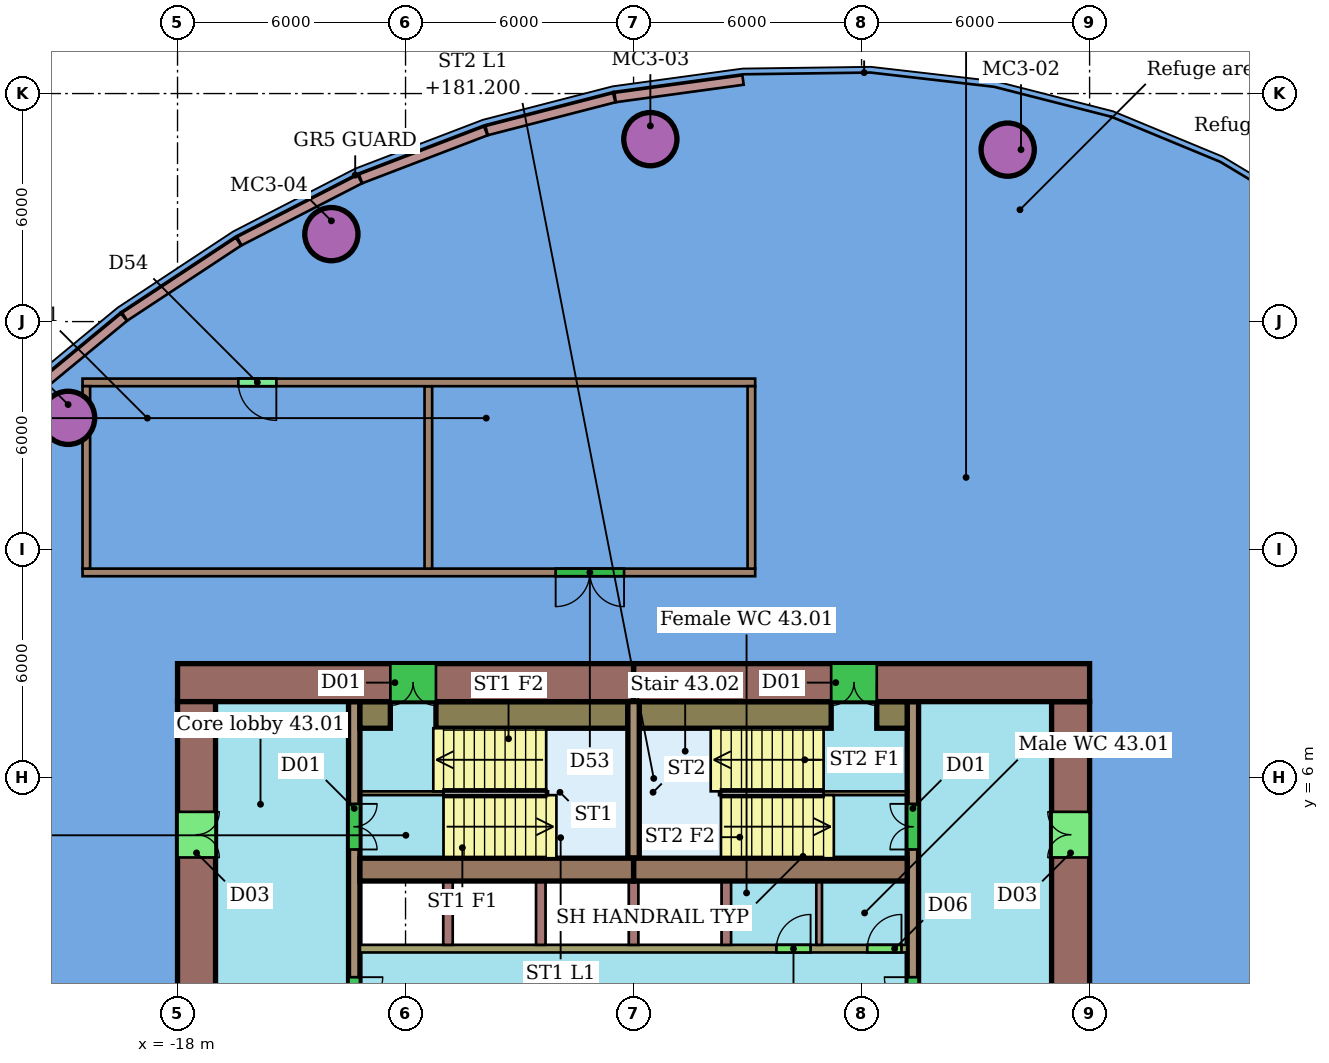
"""IFC4 building model, lengths in metres.
Left out: names, types, materials, properties, quantities, classifications, styles, units other than length and angle.
Written with IfcOpenShell. Run it as: python <this file> out.ifc"""

import sys

from ifc_helpers import new_model, si_unit, direction, frame, frame_2d, origin, origin_2d, place, context, subcontext, project, spatial, rectangle, hollow_circle, extrude, element, fill, save


model = new_model("IFC4")
c1 = context("Model", 3, precision=1e-05, world=origin(), true_north=direction((0.0, 1.0)))
c2 = subcontext(c1, "Body", "Model", "MODEL_VIEW")
j1 = project(units=[si_unit("LENGTHUNIT", "METRE"), si_unit("PLANEANGLEUNIT", "RADIAN")], contexts=[c1])
p1 = place(None, origin())
s1 = spatial("IfcSite", under=j1, at=p1, CompositionType="ELEMENT")
p2 = place(p1, origin())
s2 = spatial("IfcBuilding", under=s1, at=p2, CompositionType="ELEMENT")
p3 = place(p2, frame((0.0, 0.0, 179.4)))
s3 = spatial("IfcBuildingStorey", under=s2, at=p3, CompositionType="ELEMENT", Elevation=179.4)
for number, where, z_axis, x_axis in (
    (1, (3.845, 22.524, 0.0), (0.0, 0.0, 1.0), (1.0, 0.0, 0.0)),
    (2, (-5.558, 22.8, 0.0), (0.0, 0.0, 1.0), (1.0, 0.0, 0.0)),
    (3, (-13.952, 20.301, 0.0), (0.0, 0.0, 1.0), (1.0, 0.0, 0.0)),
    (4, (-20.879, 15.467, 0.0), (0.0, 0.0, 1.0), (1.0, 0.0, 0.0)),
):
    element("IfcColumn", number, at=place(p3, frame(where, z_axis=z_axis, x_axis=x_axis)), inside=s3, PredefinedType="COLUMN", context=c2, shape_type="SweptSolid", body=[
        extrude(hollow_circle(Radius=0.7, WallThickness=0.05, at=origin_2d()), origin(), (0.0, 0.0, 1.0), 3.45),
    ])
p4 = place(p3, frame((-2.8, 11.4, 0.0), z_axis=(0.0, 0.0, 1.0), x_axis=(-1.0, 0.0, 0.0)))
e5 = element("IfcWall", 5, at=p4, inside=s3, PredefinedType="PARTITIONING", context=c2, shape_type="SweptSolid", body=[
    extrude(rectangle(XDim=17.7, YDim=0.2, at=frame_2d((8.85, 0.0))), origin(), (0.0, 0.0, 1.0), 2.862),
])
p5 = place(p4, frame((3.45, 0.0, 0.0)))
e6 = element("IfcOpeningElement", 6, at=p5, cuts=e5, PredefinedType="OPENING", context=c2, shape_type="SweptSolid", body=[
    extrude(rectangle(XDim=1.8, YDim=2.4, at=frame_2d((0.9, 1.2))), frame((0.0, 0.11, 0.0), z_axis=(0.0, -1.0, 0.0), x_axis=(1.0, 0.0, 0.0)), (0.0, 0.0, 1.0), 0.22),
])
p6 = place(p3, frame((-11.4, 11.5, 0.0), z_axis=(0.0, 0.0, 1.0), x_axis=(0.0, 1.0, 0.0)))
e7 = element("IfcWall", 7, at=p6, inside=s3, PredefinedType="PARTITIONING", context=c2, shape_type="SweptSolid", body=[
    extrude(rectangle(XDim=4.8, YDim=0.2, at=frame_2d((2.4, 0.0))), origin(), (0.0, 0.0, 1.0), 2.862),
])
p7 = place(p3, frame((-2.8, 16.4, 0.0), z_axis=(0.0, 0.0, 1.0), x_axis=(-1.0, 0.0, 0.0)))
e8 = element("IfcWall", 8, at=p7, inside=s3, PredefinedType="PARTITIONING", context=c2, shape_type="SweptSolid", body=[
    extrude(rectangle(XDim=17.7, YDim=0.2, at=frame_2d((8.85, 0.0))), origin(), (0.0, 0.0, 1.0), 2.862),
])
p8 = place(p7, frame((12.6, 0.0, 0.0)))
e9 = element("IfcOpeningElement", 9, at=p8, cuts=e8, PredefinedType="OPENING", context=c2, shape_type="SweptSolid", body=[
    extrude(rectangle(XDim=1.0, YDim=2.1, at=frame_2d((0.5, 1.05))), frame((0.0, 0.11, 0.0), z_axis=(0.0, -1.0, 0.0), x_axis=(1.0, 0.0, 0.0)), (0.0, 0.0, 1.0), 0.22),
])
for number, where, z_axis, x_axis in (
    (10, (-20.4, 11.5, 0.0), (0.0, 0.0, 1.0), (0.0, 1.0, 0.0)),
    (11, (-2.9, 11.5, 0.0), (0.0, 0.0, 1.0), (0.0, 1.0, 0.0)),
):
    element("IfcWall", number, at=place(p3, frame(where, z_axis=z_axis, x_axis=x_axis)), inside=s3, PredefinedType="PARTITIONING", context=c2, shape_type="SweptSolid", body=[
        extrude(rectangle(XDim=4.8, YDim=0.2, at=frame_2d((2.4, 0.0))), origin(), (0.0, 0.0, 1.0), 2.862),
    ])
p9 = place(p3, frame((-3.119, 24.356, 0.0), z_axis=(0.0, 0.0, 1.0), x_axis=(-0.990801720843, -0.135321653757, 0.0)))
e12 = element("IfcWall", 12, at=p9, inside=s3, PredefinedType="SOLIDWALL", context=c2, shape_type="SweptSolid", body=[
    extrude(rectangle(XDim=3.397, YDim=0.25, at=frame_2d((1.699, 0.0))), origin(), (0.0, 0.0, 1.0), 3.1),
])
p10 = place(p3, frame((-6.507, 23.892, 0.0), z_axis=(0.0, 0.0, 1.0), x_axis=(-0.968247112596, -0.249995057849, 0.0)))
e13 = element("IfcWall", 13, at=p10, inside=s3, PredefinedType="SOLIDWALL", context=c2, shape_type="SweptSolid", body=[
    extrude(rectangle(XDim=3.47, YDim=0.25, at=frame_2d((1.735, 0.0))), origin(), (0.0, 0.0, 1.0), 3.1),
])
p11 = place(p3, frame((-9.888, 23.018, 0.0), z_axis=(0.0, 0.0, 1.0), x_axis=(-0.933996829101, -0.357281294262, 0.0)))
e14 = element("IfcWall", 14, at=p11, inside=s3, PredefinedType="SOLIDWALL", context=c2, shape_type="SweptSolid", body=[
    extrude(rectangle(XDim=3.528, YDim=0.25, at=frame_2d((1.764, 0.0))), origin(), (0.0, 0.0, 1.0), 3.1),
])
p12 = place(p3, frame((-13.203, 21.748, 0.0), z_axis=(0.0, 0.0, 1.0), x_axis=(-0.889237716381, -0.457445388833, 0.0)))
e15 = element("IfcWall", 15, at=p12, inside=s3, PredefinedType="SOLIDWALL", context=c2, shape_type="SweptSolid", body=[
    extrude(rectangle(XDim=3.569, YDim=0.25, at=frame_2d((1.784, 0.0))), origin(), (0.0, 0.0, 1.0), 3.1),
])
p13 = place(p3, frame((-16.395, 20.105, 0.0), z_axis=(0.0, 0.0, 1.0), x_axis=(-0.834771348856, -0.55059676273, 0.0)))
e16 = element("IfcWall", 16, at=p13, inside=s3, PredefinedType="SOLIDWALL", context=c2, shape_type="SweptSolid", body=[
    extrude(rectangle(XDim=3.589, YDim=0.25, at=frame_2d((1.795, 0.0))), origin(), (0.0, 0.0, 1.0), 3.1),
])
p14 = place(p3, frame((-19.409, 18.116, 0.0), z_axis=(0.0, 0.0, 1.0), x_axis=(-0.771012569009, -0.63681992622, 0.0)))
e17 = element("IfcWall", 17, at=p14, inside=s3, PredefinedType="SOLIDWALL", context=c2, shape_type="SweptSolid", body=[
    extrude(rectangle(XDim=3.59, YDim=0.25, at=frame_2d((1.795, 0.0))), origin(), (0.0, 0.0, 1.0), 3.1),
])
p15 = place(p3, frame((6.0, 8.5, 0.0), z_axis=(0.0, 0.0, 1.0), x_axis=(-1.0, 0.0, 0.0)))
e18 = element("IfcWall", 18, at=p15, inside=s3, PredefinedType="SHEAR", context=c2, shape_type="SweptSolid", body=[
    extrude(rectangle(XDim=12.0, YDim=1.0, at=frame_2d((6.0, 0.0))), origin(), (0.0, 0.0, 1.0), 3.3),
])
p16 = place(p15, frame((5.6, 0.0, 0.0)))
e19 = element("IfcOpeningElement", 19, at=p16, cuts=e18, PredefinedType="OPENING", context=c2, shape_type="SweptSolid", body=[
    extrude(rectangle(XDim=1.2, YDim=2.1, at=frame_2d((0.6, 1.05))), frame((0.0, 0.51, 0.0), z_axis=(0.0, -1.0, 0.0), x_axis=(1.0, 0.0, 0.0)), (0.0, 0.0, 1.0), 1.02),
])
p17 = place(p3, frame((-6.0, 8.5, 0.0), z_axis=(0.0, 0.0, 1.0), x_axis=(-1.0, 0.0, 0.0)))
e20 = element("IfcWall", 20, at=p17, inside=s3, PredefinedType="SHEAR", context=c2, shape_type="SweptSolid", body=[
    extrude(rectangle(XDim=12.0, YDim=1.0, at=frame_2d((6.0, 0.0))), origin(), (0.0, 0.0, 1.0), 3.3),
])
p18 = place(p17, frame((5.2, 0.0, 0.0)))
e21 = element("IfcOpeningElement", 21, at=p18, cuts=e20, PredefinedType="OPENING", context=c2, shape_type="SweptSolid", body=[
    extrude(rectangle(XDim=1.2, YDim=2.1, at=frame_2d((0.6, 1.05))), frame((0.0, 0.51, 0.0), z_axis=(0.0, -1.0, 0.0), x_axis=(1.0, 0.0, 0.0)), (0.0, 0.0, 1.0), 1.02),
])
p19 = place(p3, frame((-17.5, 8.0, 0.0), z_axis=(0.0, 0.0, 1.0), x_axis=(0.0, -1.0, 0.0)))
e22 = element("IfcWall", 22, at=p19, inside=s3, PredefinedType="SHEAR", context=c2, shape_type="SweptSolid", body=[
    extrude(rectangle(XDim=16.0, YDim=1.0, at=frame_2d((8.0, 0.0))), origin(), (0.0, 0.0, 1.0), 3.3),
])
p20 = place(p19, frame((11.9, 0.0, 0.0)))
e23 = element("IfcOpeningElement", 23, at=p20, cuts=e22, PredefinedType="OPENING", context=c2, shape_type="SweptSolid", body=[
    extrude(rectangle(XDim=1.2, YDim=2.1, at=frame_2d((0.6, 1.05))), frame((0.0, 0.51, 0.0), z_axis=(0.0, -1.0, 0.0), x_axis=(1.0, 0.0, 0.0)), (0.0, 0.0, 1.0), 1.02),
])
p21 = place(p19, frame((2.9, 0.0, 0.0)))
e24 = element("IfcOpeningElement", 24, at=p21, cuts=e22, PredefinedType="OPENING", context=c2, shape_type="SweptSolid", body=[
    extrude(rectangle(XDim=1.2, YDim=2.1, at=frame_2d((0.6, 1.05))), frame((0.0, 0.51, 0.0), z_axis=(0.0, -1.0, 0.0), x_axis=(1.0, 0.0, 0.0)), (0.0, 0.0, 1.0), 1.02),
])
p22 = place(p3, frame((5.5, -8.0, 0.0), z_axis=(0.0, 0.0, 1.0), x_axis=(0.0, 1.0, 0.0)))
e25 = element("IfcWall", 25, at=p22, inside=s3, PredefinedType="SHEAR", context=c2, shape_type="SweptSolid", body=[
    extrude(rectangle(XDim=16.0, YDim=1.0, at=frame_2d((8.0, 0.0))), origin(), (0.0, 0.0, 1.0), 3.3),
])
p23 = place(p22, frame((2.9, 0.0, 0.0)))
e26 = element("IfcOpeningElement", 26, at=p23, cuts=e25, PredefinedType="OPENING", context=c2, shape_type="SweptSolid", body=[
    extrude(rectangle(XDim=1.2, YDim=2.1, at=frame_2d((0.6, 1.05))), frame((0.0, 0.51, 0.0), z_axis=(0.0, -1.0, 0.0), x_axis=(1.0, 0.0, 0.0)), (0.0, 0.0, 1.0), 1.02),
])
p24 = place(p22, frame((11.9, 0.0, 0.0)))
e27 = element("IfcOpeningElement", 27, at=p24, cuts=e25, PredefinedType="OPENING", context=c2, shape_type="SweptSolid", body=[
    extrude(rectangle(XDim=1.2, YDim=2.1, at=frame_2d((0.6, 1.05))), frame((0.0, 0.51, 0.0), z_axis=(0.0, -1.0, 0.0), x_axis=(1.0, 0.0, 0.0)), (0.0, 0.0, 1.0), 1.02),
])
for number, where, z_axis, x_axis in (
    (28, (-13.2, 3.58, 0.0), (0.0, 0.0, 1.0), (1.0, 0.0, 0.0)),
    (29, (-6.0, 3.58, 0.0), (0.0, 0.0, 1.0), (1.0, 0.0, 0.0)),
):
    element("IfcWall", number, at=place(p3, frame(where, z_axis=z_axis, x_axis=x_axis)), inside=s3, PredefinedType="SHEAR", context=c2, shape_type="SweptSolid", body=[
        extrude(rectangle(XDim=7.2, YDim=0.6, at=frame_2d((3.6, 0.0))), origin(), (0.0, 0.0, 1.0), 3.3),
    ])
p25 = place(p3, frame((-13.35, 8.0, 0.0), z_axis=(0.0, 0.0, 1.0), x_axis=(0.0, -1.0, 0.0)))
e30 = element("IfcWall", 30, at=p25, inside=s3, PredefinedType="SHEAR", context=c2, shape_type="SweptSolid", body=[
    extrude(rectangle(XDim=16.0, YDim=0.3, at=frame_2d((8.0, 0.0))), origin(), (0.0, 0.0, 1.0), 3.3),
])
p26 = place(p25, frame((2.69, 0.0, 0.0)))
e31 = element("IfcOpeningElement", 31, at=p26, cuts=e30, PredefinedType="OPENING", context=c2, shape_type="SweptSolid", body=[
    extrude(rectangle(XDim=1.2, YDim=2.1, at=frame_2d((0.6, 1.05))), frame((0.0, 0.16, 0.0), z_axis=(0.0, -1.0, 0.0), x_axis=(1.0, 0.0, 0.0)), (0.0, 0.0, 1.0), 0.32),
])
p27 = place(p25, frame((12.99, 0.0, 0.0)))
e32 = element("IfcOpeningElement", 32, at=p27, cuts=e30, PredefinedType="OPENING", context=c2, shape_type="SweptSolid", body=[
    extrude(rectangle(XDim=1.2, YDim=2.1, at=frame_2d((0.6, 1.05))), frame((0.0, 0.16, 0.0), z_axis=(0.0, -1.0, 0.0), x_axis=(1.0, 0.0, 0.0)), (0.0, 0.0, 1.0), 0.32),
])
p28 = place(p25, frame((7.25, 0.0, 0.0)))
e33 = element("IfcOpeningElement", 33, at=p28, cuts=e30, PredefinedType="OPENING", context=c2, shape_type="SweptSolid", body=[
    extrude(rectangle(XDim=1.5, YDim=2.1, at=frame_2d((0.75, 1.05))), frame((0.0, 0.16, 0.0), z_axis=(0.0, -1.0, 0.0), x_axis=(1.0, 0.0, 0.0)), (0.0, 0.0, 1.0), 0.32),
])
p29 = place(p3, frame((1.35, -8.0, 0.0), z_axis=(0.0, 0.0, 1.0), x_axis=(0.0, 1.0, 0.0)))
e34 = element("IfcWall", 34, at=p29, inside=s3, PredefinedType="SHEAR", context=c2, shape_type="SweptSolid", body=[
    extrude(rectangle(XDim=16.0, YDim=0.3, at=frame_2d((8.0, 0.0))), origin(), (0.0, 0.0, 1.0), 3.3),
])
p30 = place(p29, frame((12.11, 0.0, 0.0)))
e35 = element("IfcOpeningElement", 35, at=p30, cuts=e34, PredefinedType="OPENING", context=c2, shape_type="SweptSolid", body=[
    extrude(rectangle(XDim=1.2, YDim=2.1, at=frame_2d((0.6, 1.05))), frame((0.0, 0.16, 0.0), z_axis=(0.0, -1.0, 0.0), x_axis=(1.0, 0.0, 0.0)), (0.0, 0.0, 1.0), 0.32),
])
p31 = place(p29, frame((1.91, 0.0, 0.0)))
e36 = element("IfcOpeningElement", 36, at=p31, cuts=e34, PredefinedType="OPENING", context=c2, shape_type="SweptSolid", body=[
    extrude(rectangle(XDim=1.0, YDim=2.1, at=frame_2d((0.5, 1.05))), frame((0.0, 0.16, 0.0), z_axis=(0.0, -1.0, 0.0), x_axis=(1.0, 0.0, 0.0)), (0.0, 0.0, 1.0), 0.32),
])
p32 = place(p29, frame((7.25, 0.0, 0.0)))
e37 = element("IfcOpeningElement", 37, at=p32, cuts=e34, PredefinedType="OPENING", context=c2, shape_type="SweptSolid", body=[
    extrude(rectangle(XDim=1.5, YDim=2.1, at=frame_2d((0.75, 1.05))), frame((0.0, 0.16, 0.0), z_axis=(0.0, -1.0, 0.0), x_axis=(1.0, 0.0, 0.0)), (0.0, 0.0, 1.0), 0.32),
])
p33 = place(p3, frame((-13.2, 1.5, 0.0), z_axis=(0.0, 0.0, 1.0), x_axis=(1.0, 0.0, 0.0)))
e38 = element("IfcWall", 38, at=p33, inside=s3, PredefinedType="SHEAR", context=c2, shape_type="SweptSolid", body=[
    extrude(rectangle(XDim=14.4, YDim=0.2, at=frame_2d((7.2, 0.0))), origin(), (0.0, 0.0, 1.0), 3.3),
])
p34 = place(p33, frame((10.958, 0.0, 0.0)))
e39 = element("IfcOpeningElement", 39, at=p34, cuts=e38, PredefinedType="OPENING", context=c2, shape_type="SweptSolid", body=[
    extrude(rectangle(XDim=0.9, YDim=2.1, at=frame_2d((0.45, 1.05))), frame((0.0, 0.11, 0.0), z_axis=(0.0, -1.0, 0.0), x_axis=(1.0, 0.0, 0.0)), (0.0, 0.0, 1.0), 0.22),
])
p35 = place(p33, frame((13.35, 0.0, 0.0)))
e40 = element("IfcOpeningElement", 40, at=p35, cuts=e38, PredefinedType="OPENING", context=c2, shape_type="SweptSolid", body=[
    extrude(rectangle(XDim=0.9, YDim=2.1, at=frame_2d((0.45, 1.05))), frame((0.0, 0.11, 0.0), z_axis=(0.0, -1.0, 0.0), x_axis=(1.0, 0.0, 0.0)), (0.0, 0.0, 1.0), 0.22),
])
p36 = place(p3, frame((-6.0, 3.88, 0.0), z_axis=(0.0, 0.0, 1.0), x_axis=(0.0, 1.0, 0.0)))
e41 = element("IfcWall", 41, at=p36, inside=s3, PredefinedType="SHEAR", context=c2, shape_type="SweptSolid", body=[
    extrude(rectangle(XDim=4.12, YDim=0.3, at=frame_2d((2.06, 0.0))), origin(), (0.0, 0.0, 1.0), 3.3),
])
p37 = place(p3, frame((-13.2, 7.65, 0.0), z_axis=(0.0, 0.0, 1.0), x_axis=(1.0, 0.0, 0.0)))
e42 = element("IfcWall", 42, at=p37, inside=s3, PredefinedType="SHEAR", context=c2, shape_type="SweptSolid", body=[
    extrude(rectangle(XDim=0.8, YDim=0.7, at=frame_2d((0.4, 0.0))), origin(), (0.0, 0.0, 1.0), 3.3),
])
for number, where, z_axis, x_axis in (
    (43, (-11.2, 7.65, 0.0), (0.0, 0.0, 1.0), (1.0, 0.0, 0.0)),
    (44, (-5.85, 7.65, 0.0), (0.0, 0.0, 1.0), (1.0, 0.0, 0.0)),
):
    element("IfcWall", number, at=place(p3, frame(where, z_axis=z_axis, x_axis=x_axis)), inside=s3, PredefinedType="SHEAR", context=c2, shape_type="SweptSolid", body=[
        extrude(rectangle(XDim=5.05, YDim=0.7, at=frame_2d((2.525, 0.0))), origin(), (0.0, 0.0, 1.0), 3.3),
    ])
p38 = place(p3, frame((0.4, 7.65, 0.0), z_axis=(0.0, 0.0, 1.0), x_axis=(1.0, 0.0, 0.0)))
e45 = element("IfcWall", 45, at=p38, inside=s3, PredefinedType="SHEAR", context=c2, shape_type="SweptSolid", body=[
    extrude(rectangle(XDim=0.8, YDim=0.7, at=frame_2d((0.4, 0.0))), origin(), (0.0, 0.0, 1.0), 3.3),
])
for number, where, z_axis, x_axis in (
    (46, (-13.2, 5.59, 0.0), (0.0, 0.0, 1.0), (1.0, 0.0, 0.0)),
    (47, (1.2, 5.59, 0.0), (0.0, 0.0, 1.0), (-1.0, 0.0, 0.0)),
):
    element("IfcWall", number, at=place(p3, frame(where, z_axis=z_axis, x_axis=x_axis)), inside=s3, PredefinedType="SHEAR", context=c2, shape_type="SweptSolid", body=[
        extrude(rectangle(XDim=2.2, YDim=0.1, at=frame_2d((1.1, 0.0))), origin(), (0.0, 0.0, 1.0), 3.3),
    ])
for number, where, z_axis, x_axis in (
    (48, (-10.883, 1.6, 0.0), (0.0, 0.0, 1.0), (0.0, 1.0, 0.0)),
    (49, (-8.442, 1.6, 0.0), (0.0, 0.0, 1.0), (0.0, 1.0, 0.0)),
    (50, (-6.0, 1.6, 0.0), (0.0, 0.0, 1.0), (0.0, 1.0, 0.0)),
    (51, (-3.558, 1.6, 0.0), (0.0, 0.0, 1.0), (0.0, 1.0, 0.0)),
):
    element("IfcWall", number, at=place(p3, frame(where, z_axis=z_axis, x_axis=x_axis)), inside=s3, PredefinedType="SHEAR", context=c2, shape_type="SweptSolid", body=[
        extrude(rectangle(XDim=1.68, YDim=0.25, at=frame_2d((0.84, 0.0))), origin(), (0.0, 0.0, 1.0), 3.3),
    ])
p39 = place(p3, frame((-1.117, 1.6, 0.0), z_axis=(0.0, 0.0, 1.0), x_axis=(0.0, 1.0, 0.0)))
e52 = element("IfcWall", 52, at=p39, inside=s3, PredefinedType="PARTITIONING", context=c2, shape_type="SweptSolid", body=[
    extrude(rectangle(XDim=1.68, YDim=0.15, at=frame_2d((0.84, 0.0))), origin(), (0.0, 0.0, 1.0), 3.3),
])
p40 = place(p5, origin())
e53 = element("IfcDoor", 53, at=p40, inside=s3, OperationType="DOUBLE_DOOR_SINGLE_SWING", PredefinedType="DOOR", context=c2, shape_type="SweptSolid", body=[
    extrude(rectangle(XDim=1.8, YDim=2.4, at=frame_2d((0.9, 1.2))), frame((0.0, 0.025, 0.0), z_axis=(0.0, -1.0, 0.0), x_axis=(1.0, 0.0, 0.0)), (0.0, 0.0, 1.0), 0.05),
])
fill(e6, e53)
p41 = place(p8, origin())
e54 = element("IfcDoor", 54, at=p41, inside=s3, OperationType="SINGLE_SWING_LEFT", PredefinedType="DOOR", context=c2, shape_type="SweptSolid", body=[
    extrude(rectangle(XDim=1.0, YDim=2.1, at=frame_2d((0.5, 1.05))), frame((0.0, 0.025, 0.0), z_axis=(0.0, -1.0, 0.0), x_axis=(1.0, 0.0, 0.0)), (0.0, 0.0, 1.0), 0.05),
])
fill(e9, e54)
p42 = place(p16, origin())
e55 = element("IfcDoor", 55, at=p42, inside=s3, OperationType="DOUBLE_DOOR_SINGLE_SWING", PredefinedType="NOTDEFINED", context=c2, shape_type="SweptSolid", body=[
    extrude(rectangle(XDim=1.2, YDim=2.1, at=frame_2d((0.6, 1.05))), frame((0.0, 0.025, 0.0), z_axis=(0.0, -1.0, 0.0), x_axis=(1.0, 0.0, 0.0)), (0.0, 0.0, 1.0), 0.05),
])
fill(e19, e55)
p43 = place(p18, origin())
e56 = element("IfcDoor", 56, at=p43, inside=s3, OperationType="DOUBLE_DOOR_SINGLE_SWING", PredefinedType="NOTDEFINED", context=c2, shape_type="SweptSolid", body=[
    extrude(rectangle(XDim=1.2, YDim=2.1, at=frame_2d((0.6, 1.05))), frame((0.0, 0.025, 0.0), z_axis=(0.0, -1.0, 0.0), x_axis=(1.0, 0.0, 0.0)), (0.0, 0.0, 1.0), 0.05),
])
fill(e21, e56)
p44 = place(p21, origin())
e57 = element("IfcDoor", 57, at=p44, inside=s3, OperationType="DOUBLE_DOOR_SINGLE_SWING", PredefinedType="NOTDEFINED", context=c2, shape_type="SweptSolid", body=[
    extrude(rectangle(XDim=1.2, YDim=2.1, at=frame_2d((0.6, 1.05))), frame((0.0, 0.025, 0.0), z_axis=(0.0, -1.0, 0.0), x_axis=(1.0, 0.0, 0.0)), (0.0, 0.0, 1.0), 0.05),
])
fill(e24, e57)
p45 = place(p24, origin())
e58 = element("IfcDoor", 58, at=p45, inside=s3, OperationType="DOUBLE_DOOR_SINGLE_SWING", PredefinedType="NOTDEFINED", context=c2, shape_type="SweptSolid", body=[
    extrude(rectangle(XDim=1.2, YDim=2.1, at=frame_2d((0.6, 1.05))), frame((0.0, 0.025, 0.0), z_axis=(0.0, -1.0, 0.0), x_axis=(1.0, 0.0, 0.0)), (0.0, 0.0, 1.0), 0.05),
])
fill(e27, e58)
p46 = place(p26, origin())
e59 = element("IfcDoor", 59, at=p46, inside=s3, OperationType="DOUBLE_DOOR_SINGLE_SWING", PredefinedType="NOTDEFINED", context=c2, shape_type="SweptSolid", body=[
    extrude(rectangle(XDim=1.2, YDim=2.1, at=frame_2d((0.6, 1.05))), frame((0.0, 0.025, 0.0), z_axis=(0.0, -1.0, 0.0), x_axis=(1.0, 0.0, 0.0)), (0.0, 0.0, 1.0), 0.05),
])
fill(e31, e59)
p47 = place(p28, origin())
e60 = element("IfcDoor", 60, at=p47, inside=s3, OperationType="DOUBLE_DOOR_SINGLE_SWING", PredefinedType="NOTDEFINED", context=c2, shape_type="SweptSolid", body=[
    extrude(rectangle(XDim=1.5, YDim=2.1, at=frame_2d((0.75, 1.05))), frame((0.0, 0.025, 0.0), z_axis=(0.0, -1.0, 0.0), x_axis=(1.0, 0.0, 0.0)), (0.0, 0.0, 1.0), 0.05),
])
fill(e33, e60)
p48 = place(p30, origin())
e61 = element("IfcDoor", 61, at=p48, inside=s3, OperationType="DOUBLE_DOOR_SINGLE_SWING", PredefinedType="NOTDEFINED", context=c2, shape_type="SweptSolid", body=[
    extrude(rectangle(XDim=1.2, YDim=2.1, at=frame_2d((0.6, 1.05))), frame((0.0, 0.025, 0.0), z_axis=(0.0, -1.0, 0.0), x_axis=(1.0, 0.0, 0.0)), (0.0, 0.0, 1.0), 0.05),
])
fill(e35, e61)
p49 = place(p32, origin())
e62 = element("IfcDoor", 62, at=p49, inside=s3, OperationType="DOUBLE_DOOR_SINGLE_SWING", PredefinedType="NOTDEFINED", context=c2, shape_type="SweptSolid", body=[
    extrude(rectangle(XDim=1.5, YDim=2.1, at=frame_2d((0.75, 1.05))), frame((0.0, 0.025, 0.0), z_axis=(0.0, -1.0, 0.0), x_axis=(1.0, 0.0, 0.0)), (0.0, 0.0, 1.0), 0.05),
])
fill(e37, e62)
p50 = place(p34, origin())
e63 = element("IfcDoor", 63, at=p50, inside=s3, OperationType="SINGLE_SWING_RIGHT", PredefinedType="NOTDEFINED", context=c2, shape_type="SweptSolid", body=[
    extrude(rectangle(XDim=0.9, YDim=2.1, at=frame_2d((0.45, 1.05))), frame((0.0, 0.025, 0.0), z_axis=(0.0, -1.0, 0.0), x_axis=(1.0, 0.0, 0.0)), (0.0, 0.0, 1.0), 0.05),
])
fill(e39, e63)
p51 = place(p35, origin())
e64 = element("IfcDoor", 64, at=p51, inside=s3, OperationType="SINGLE_SWING_RIGHT", PredefinedType="NOTDEFINED", context=c2, shape_type="SweptSolid", body=[
    extrude(rectangle(XDim=0.9, YDim=2.1, at=frame_2d((0.45, 1.05))), frame((0.0, 0.025, 0.0), z_axis=(0.0, -1.0, 0.0), x_axis=(1.0, 0.0, 0.0)), (0.0, 0.0, 1.0), 0.05),
])
fill(e40, e64)
save(model, sys.argv[1])
